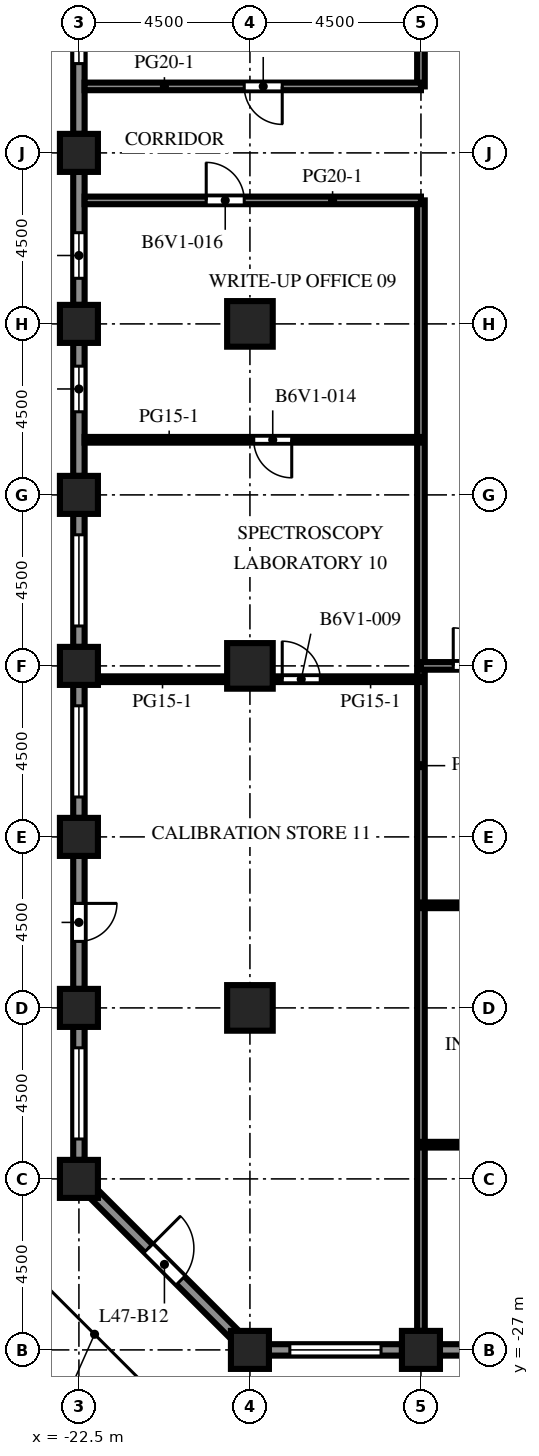
"""IFC4 building model, lengths in metres.
Left out: names, types, materials, properties, quantities, classifications, styles, units other than length and angle.
Written with IfcOpenShell. Run it as: python <this file> out.ifc"""

import sys

from ifc_helpers import new_model, si_unit, direction, frame, frame_2d, origin, origin_2d, place, context, subcontext, project, spatial, rectangle, extrude, element, fill, save


model = new_model("IFC4")
c1 = context("Model", 3, precision=1e-05, world=origin(), true_north=direction((0.0, 1.0)))
c2 = subcontext(c1, "Body", "Model", "MODEL_VIEW")
j1 = project(units=[si_unit("LENGTHUNIT", "METRE"), si_unit("PLANEANGLEUNIT", "RADIAN")], contexts=[c1])
p1 = place(None, origin())
s1 = spatial("IfcSite", under=j1, at=p1, CompositionType="ELEMENT")
p2 = place(p1, origin())
s2 = spatial("IfcBuilding", under=s1, at=p2, CompositionType="ELEMENT")
p3 = place(p2, frame((0.0, 0.0, 207.9)))
s3 = spatial("IfcBuildingStorey", under=s2, at=p3, CompositionType="ELEMENT", Elevation=207.9)
for number, where, z_axis, x_axis in (
    (1, (-22.5, -22.5, 0.0), (0.0, 0.0, 1.0), (1.0, 0.0, 0.0)),
    (2, (-22.5, -18.0, 0.0), (0.0, 0.0, 1.0), (1.0, 0.0, 0.0)),
    (3, (-22.5, -13.5, 0.0), (0.0, 0.0, 1.0), (1.0, 0.0, 0.0)),
    (4, (-22.5, -9.0, 0.0), (0.0, 0.0, 1.0), (1.0, 0.0, 0.0)),
    (5, (-22.5, -4.5, 0.0), (0.0, 0.0, 1.0), (1.0, 0.0, 0.0)),
    (6, (-22.5, 0.0, 0.0), (0.0, 0.0, 1.0), (1.0, 0.0, 0.0)),
    (7, (-22.5, 4.5, 0.0), (0.0, 0.0, 1.0), (1.0, 0.0, 0.0)),
    (8, (-18.0, -27.0, 0.0), (0.0, 0.0, 1.0), (1.0, 0.0, 0.0)),
    (9, (-13.5, -27.0, 0.0), (0.0, 0.0, 1.0), (1.0, 0.0, 0.0)),
):
    element("IfcColumn", number, at=place(p3, frame(where, z_axis=z_axis, x_axis=x_axis)), inside=s3, PredefinedType="COLUMN", context=c2, shape_type="SweptSolid", body=[
        extrude(rectangle(XDim=1.0, YDim=1.0, at=origin_2d()), origin(), (0.0, 0.0, 1.0), 4.1),
    ])
for number, where, z_axis, x_axis in (
    (10, (-18.0, -18.0, 0.0), (0.0, 0.0, 1.0), (1.0, 0.0, 0.0)),
    (11, (-18.0, -9.0, 0.0), (0.0, 0.0, 1.0), (1.0, 0.0, 0.0)),
    (12, (-18.0, 0.0, 0.0), (0.0, 0.0, 1.0), (1.0, 0.0, 0.0)),
):
    element("IfcColumn", number, at=place(p3, frame(where, z_axis=z_axis, x_axis=x_axis)), inside=s3, PredefinedType="COLUMN", context=c2, shape_type="SweptSolid", body=[
        extrude(rectangle(XDim=1.2, YDim=1.2, at=origin_2d()), origin(), (0.0, 0.0, 1.0), 4.1),
    ])
p4 = place(p3, frame((-14.0, -27.0, 0.0), z_axis=(0.0, 0.0, 1.0), x_axis=(-1.0, 0.0, 0.0)))
e13 = element("IfcWall", 13, at=p4, inside=s3, PredefinedType="SOLIDWALL", context=c2, shape_type="SweptSolid", body=[
    extrude(rectangle(XDim=3.5, YDim=0.3, at=frame_2d((1.75, 0.0))), origin(), (0.0, 0.0, 1.0), 2.85),
])
p5 = place(p4, frame((0.55, 0.0, 0.8)))
e14 = element("IfcOpeningElement", 14, at=p5, cuts=e13, PredefinedType="OPENING", context=c2, shape_type="SweptSolid", body=[
    extrude(rectangle(XDim=2.4, YDim=1.7, at=frame_2d((1.2, 0.85))), frame((0.0, 0.16, 0.0), z_axis=(0.0, -1.0, 0.0), x_axis=(1.0, 0.0, 0.0)), (0.0, 0.0, 1.0), 0.32),
])
p6 = place(p3, frame((-9.5, -27.0, 0.0), z_axis=(0.0, 0.0, 1.0), x_axis=(-1.0, 0.0, 0.0)))
e15 = element("IfcWall", 15, at=p6, inside=s3, PredefinedType="SOLIDWALL", context=c2, shape_type="SweptSolid", body=[
    extrude(rectangle(XDim=3.5, YDim=0.3, at=frame_2d((1.75, 0.0))), origin(), (0.0, 0.0, 1.0), 2.85),
])
p7 = place(p6, frame((1.25, 0.0, 0.0)))
e16 = element("IfcOpeningElement", 16, at=p7, cuts=e15, PredefinedType="OPENING", context=c2, shape_type="SweptSolid", body=[
    extrude(rectangle(XDim=1.0, YDim=2.2, at=frame_2d((0.5, 1.1))), frame((0.0, 0.16, 0.0), z_axis=(0.0, -1.0, 0.0), x_axis=(1.0, 0.0, 0.0)), (0.0, 0.0, 1.0), 0.32),
])
p8 = place(p3, frame((-22.5, 5.0, 0.0), z_axis=(0.0, 0.0, 1.0), x_axis=(0.0, 1.0, 0.0)))
e17 = element("IfcWall", 17, at=p8, inside=s3, PredefinedType="SOLIDWALL", context=c2, shape_type="SweptSolid", body=[
    extrude(rectangle(XDim=3.5, YDim=0.3, at=frame_2d((1.75, 0.0))), origin(), (0.0, 0.0, 1.0), 2.85),
])
p9 = place(p8, frame((1.85, 0.0, 0.8)))
e18 = element("IfcOpeningElement", 18, at=p9, cuts=e17, PredefinedType="OPENING", context=c2, shape_type="SweptSolid", body=[
    extrude(rectangle(XDim=1.2, YDim=1.7, at=frame_2d((0.6, 0.85))), frame((0.0, 0.16, 0.0), z_axis=(0.0, -1.0, 0.0), x_axis=(1.0, 0.0, 0.0)), (0.0, 0.0, 1.0), 0.32),
])
p10 = place(p3, frame((-22.5, 0.5, 0.0), z_axis=(0.0, 0.0, 1.0), x_axis=(0.0, 1.0, 0.0)))
e19 = element("IfcWall", 19, at=p10, inside=s3, PredefinedType="SOLIDWALL", context=c2, shape_type="SweptSolid", body=[
    extrude(rectangle(XDim=3.5, YDim=0.3, at=frame_2d((1.75, 0.0))), origin(), (0.0, 0.0, 1.0), 2.85),
])
p11 = place(p10, frame((0.7, 0.0, 0.8)))
e20 = element("IfcOpeningElement", 20, at=p11, cuts=e19, PredefinedType="OPENING", context=c2, shape_type="SweptSolid", body=[
    extrude(rectangle(XDim=1.2, YDim=1.7, at=frame_2d((0.6, 0.85))), frame((0.0, 0.16, 0.0), z_axis=(0.0, -1.0, 0.0), x_axis=(1.0, 0.0, 0.0)), (0.0, 0.0, 1.0), 0.32),
])
p12 = place(p3, frame((-22.5, -4.0, 0.0), z_axis=(0.0, 0.0, 1.0), x_axis=(0.0, 1.0, 0.0)))
e21 = element("IfcWall", 21, at=p12, inside=s3, PredefinedType="SOLIDWALL", context=c2, shape_type="SweptSolid", body=[
    extrude(rectangle(XDim=3.5, YDim=0.3, at=frame_2d((1.75, 0.0))), origin(), (0.0, 0.0, 1.0), 2.85),
])
p13 = place(p12, frame((1.688, 0.0, 0.8)))
e22 = element("IfcOpeningElement", 22, at=p13, cuts=e21, PredefinedType="OPENING", context=c2, shape_type="SweptSolid", body=[
    extrude(rectangle(XDim=1.2, YDim=1.7, at=frame_2d((0.6, 0.85))), frame((0.0, 0.16, 0.0), z_axis=(0.0, -1.0, 0.0), x_axis=(1.0, 0.0, 0.0)), (0.0, 0.0, 1.0), 0.32),
])
p14 = place(p3, frame((-22.5, -8.5, 0.0), z_axis=(0.0, 0.0, 1.0), x_axis=(0.0, 1.0, 0.0)))
e23 = element("IfcWall", 23, at=p14, inside=s3, PredefinedType="SOLIDWALL", context=c2, shape_type="SweptSolid", body=[
    extrude(rectangle(XDim=3.5, YDim=0.3, at=frame_2d((1.75, 0.0))), origin(), (0.0, 0.0, 1.0), 2.85),
])
p15 = place(p14, frame((0.55, 0.0, 0.8)))
e24 = element("IfcOpeningElement", 24, at=p15, cuts=e23, PredefinedType="OPENING", context=c2, shape_type="SweptSolid", body=[
    extrude(rectangle(XDim=2.4, YDim=1.7, at=frame_2d((1.2, 0.85))), frame((0.0, 0.16, 0.0), z_axis=(0.0, -1.0, 0.0), x_axis=(1.0, 0.0, 0.0)), (0.0, 0.0, 1.0), 0.32),
])
p16 = place(p3, frame((-22.5, -13.0, 0.0), z_axis=(0.0, 0.0, 1.0), x_axis=(0.0, 1.0, 0.0)))
e25 = element("IfcWall", 25, at=p16, inside=s3, PredefinedType="SOLIDWALL", context=c2, shape_type="SweptSolid", body=[
    extrude(rectangle(XDim=3.5, YDim=0.3, at=frame_2d((1.75, 0.0))), origin(), (0.0, 0.0, 1.0), 2.85),
])
p17 = place(p16, frame((0.55, 0.0, 0.8)))
e26 = element("IfcOpeningElement", 26, at=p17, cuts=e25, PredefinedType="OPENING", context=c2, shape_type="SweptSolid", body=[
    extrude(rectangle(XDim=2.4, YDim=1.7, at=frame_2d((1.2, 0.85))), frame((0.0, 0.16, 0.0), z_axis=(0.0, -1.0, 0.0), x_axis=(1.0, 0.0, 0.0)), (0.0, 0.0, 1.0), 0.32),
])
p18 = place(p3, frame((-22.5, -17.5, 0.0), z_axis=(0.0, 0.0, 1.0), x_axis=(0.0, 1.0, 0.0)))
e27 = element("IfcWall", 27, at=p18, inside=s3, PredefinedType="SOLIDWALL", context=c2, shape_type="SweptSolid", body=[
    extrude(rectangle(XDim=3.5, YDim=0.3, at=frame_2d((1.75, 0.0))), origin(), (0.0, 0.0, 1.0), 2.85),
])
p19 = place(p18, frame((1.25, 0.0, 0.0)))
e28 = element("IfcOpeningElement", 28, at=p19, cuts=e27, PredefinedType="OPENING", context=c2, shape_type="SweptSolid", body=[
    extrude(rectangle(XDim=1.0, YDim=2.2, at=frame_2d((0.5, 1.1))), frame((0.0, 0.16, 0.0), z_axis=(0.0, -1.0, 0.0), x_axis=(1.0, 0.0, 0.0)), (0.0, 0.0, 1.0), 0.32),
])
p20 = place(p3, frame((-22.5, -22.0, 0.0), z_axis=(0.0, 0.0, 1.0), x_axis=(0.0, 1.0, 0.0)))
e29 = element("IfcWall", 29, at=p20, inside=s3, PredefinedType="SOLIDWALL", context=c2, shape_type="SweptSolid", body=[
    extrude(rectangle(XDim=3.5, YDim=0.3, at=frame_2d((1.75, 0.0))), origin(), (0.0, 0.0, 1.0), 2.85),
])
p21 = place(p20, frame((0.55, 0.0, 0.8)))
e30 = element("IfcOpeningElement", 30, at=p21, cuts=e29, PredefinedType="OPENING", context=c2, shape_type="SweptSolid", body=[
    extrude(rectangle(XDim=2.4, YDim=1.7, at=frame_2d((1.2, 0.85))), frame((0.0, 0.16, 0.0), z_axis=(0.0, -1.0, 0.0), x_axis=(1.0, 0.0, 0.0)), (0.0, 0.0, 1.0), 0.32),
])
p22 = place(p3, frame((-18.394, -26.606, 0.0), z_axis=(0.0, 0.0, 1.0), x_axis=(-0.707106781187, 0.707106781187, 0.0)))
e31 = element("IfcWall", 31, at=p22, inside=s3, PredefinedType="SOLIDWALL", context=c2, shape_type="SweptSolid", body=[
    extrude(rectangle(XDim=5.25, YDim=0.3, at=frame_2d((2.625, 0.0))), origin(), (0.0, 0.0, 1.0), 2.85),
])
p23 = place(p22, frame((2.025, 0.0, 0.0)))
e32 = element("IfcOpeningElement", 32, at=p23, cuts=e31, PredefinedType="OPENING", context=c2, shape_type="SweptSolid", body=[
    extrude(rectangle(XDim=1.2, YDim=2.2, at=frame_2d((0.6, 1.1))), frame((0.0, 0.16, 0.0), z_axis=(0.0, -1.0, 0.0), x_axis=(1.0, 0.0, 0.0)), (0.0, 0.0, 1.0), 0.32),
])
p24 = place(p3, frame((-13.5, -26.5, 0.0), z_axis=(0.0, 0.0, 1.0), x_axis=(0.0, 1.0, 0.0)))
e33 = element("IfcWall", 33, at=p24, inside=s3, PredefinedType="PARTITIONING", context=c2, shape_type="SweptSolid", body=[
    extrude(rectangle(XDim=29.75, YDim=0.2, at=frame_2d((14.875, 0.0))), origin(), (0.0, 0.0, 1.0), 3.65),
])
p25 = place(p3, frame((-13.5, 6.25, 0.0), z_axis=(0.0, 0.0, 1.0), x_axis=(0.0, 1.0, 0.0)))
e34 = element("IfcWall", 34, at=p25, inside=s3, PredefinedType="PARTITIONING", context=c2, shape_type="SweptSolid", body=[
    extrude(rectangle(XDim=20.25, YDim=0.2, at=frame_2d((10.125, 0.0))), origin(), (0.0, 0.0, 1.0), 3.65),
])
p26 = place(p3, frame((21.0, -21.6, 0.0), z_axis=(0.0, 0.0, 1.0), x_axis=(-1.0, 0.0, 0.0)))
e35 = element("IfcWall", 35, at=p26, inside=s3, PredefinedType="PARTITIONING", context=c2, shape_type="SweptSolid", body=[
    extrude(rectangle(XDim=34.5, YDim=0.15, at=frame_2d((17.25, 0.0))), origin(), (0.0, 0.0, 1.0), 3.65),
])
p27 = place(p26, frame((29.9, 0.0, 0.0)))
e36 = element("IfcOpeningElement", 36, at=p27, cuts=e35, PredefinedType="OPENING", context=c2, shape_type="SweptSolid", body=[
    extrude(rectangle(XDim=1.0, YDim=2.1, at=frame_2d((0.5, 1.05))), frame((0.0, 0.085, 0.0), z_axis=(0.0, -1.0, 0.0), x_axis=(1.0, 0.0, 0.0)), (0.0, 0.0, 1.0), 0.17),
])
p28 = place(p26, frame((21.4, 0.0, 0.0)))
e37 = element("IfcOpeningElement", 37, at=p28, cuts=e35, PredefinedType="OPENING", context=c2, shape_type="SweptSolid", body=[
    extrude(rectangle(XDim=1.0, YDim=2.1, at=frame_2d((0.5, 1.05))), frame((0.0, 0.085, 0.0), z_axis=(0.0, -1.0, 0.0), x_axis=(1.0, 0.0, 0.0)), (0.0, 0.0, 1.0), 0.17),
])
p29 = place(p26, frame((13.15, 0.0, 0.0)))
e38 = element("IfcOpeningElement", 38, at=p29, cuts=e35, PredefinedType="OPENING", context=c2, shape_type="SweptSolid", body=[
    extrude(rectangle(XDim=1.0, YDim=2.1, at=frame_2d((0.5, 1.05))), frame((0.0, 0.085, 0.0), z_axis=(0.0, -1.0, 0.0), x_axis=(1.0, 0.0, 0.0)), (0.0, 0.0, 1.0), 0.17),
])
p30 = place(p26, frame((5.15, 0.0, 0.0)))
e39 = element("IfcOpeningElement", 39, at=p30, cuts=e35, PredefinedType="OPENING", context=c2, shape_type="SweptSolid", body=[
    extrude(rectangle(XDim=1.0, YDim=2.1, at=frame_2d((0.5, 1.05))), frame((0.0, 0.085, 0.0), z_axis=(0.0, -1.0, 0.0), x_axis=(1.0, 0.0, 0.0)), (0.0, 0.0, 1.0), 0.17),
])
p31 = place(p3, frame((21.0, -15.3, 0.0), z_axis=(0.0, 0.0, 1.0), x_axis=(-1.0, 0.0, 0.0)))
e40 = element("IfcWall", 40, at=p31, inside=s3, PredefinedType="PARTITIONING", context=c2, shape_type="SweptSolid", body=[
    extrude(rectangle(XDim=34.5, YDim=0.15, at=frame_2d((17.25, 0.0))), origin(), (0.0, 0.0, 1.0), 3.65),
])
p32 = place(p31, frame((28.9, 0.0, 0.0)))
e41 = element("IfcOpeningElement", 41, at=p32, cuts=e40, PredefinedType="OPENING", context=c2, shape_type="SweptSolid", body=[
    extrude(rectangle(XDim=1.0, YDim=2.1, at=frame_2d((0.5, 1.05))), frame((0.0, 0.085, 0.0), z_axis=(0.0, -1.0, 0.0), x_axis=(1.0, 0.0, 0.0)), (0.0, 0.0, 1.0), 0.17),
])
p33 = place(p31, frame((19.4, 0.0, 0.0)))
e42 = element("IfcOpeningElement", 42, at=p33, cuts=e40, PredefinedType="OPENING", context=c2, shape_type="SweptSolid", body=[
    extrude(rectangle(XDim=1.0, YDim=2.1, at=frame_2d((0.5, 1.05))), frame((0.0, 0.085, 0.0), z_axis=(0.0, -1.0, 0.0), x_axis=(1.0, 0.0, 0.0)), (0.0, 0.0, 1.0), 0.17),
])
p34 = place(p31, frame((14.15, 0.0, 0.0)))
e43 = element("IfcOpeningElement", 43, at=p34, cuts=e40, PredefinedType="OPENING", context=c2, shape_type="SweptSolid", body=[
    extrude(rectangle(XDim=1.0, YDim=2.1, at=frame_2d((0.5, 1.05))), frame((0.0, 0.085, 0.0), z_axis=(0.0, -1.0, 0.0), x_axis=(1.0, 0.0, 0.0)), (0.0, 0.0, 1.0), 0.17),
])
p35 = place(p31, frame((3.9, 0.0, 0.0)))
e44 = element("IfcOpeningElement", 44, at=p35, cuts=e40, PredefinedType="OPENING", context=c2, shape_type="SweptSolid", body=[
    extrude(rectangle(XDim=1.0, YDim=2.1, at=frame_2d((0.5, 1.05))), frame((0.0, 0.085, 0.0), z_axis=(0.0, -1.0, 0.0), x_axis=(1.0, 0.0, 0.0)), (0.0, 0.0, 1.0), 0.17),
])
p36 = place(p3, frame((-22.0, -9.35, 0.0), z_axis=(0.0, 0.0, 1.0), x_axis=(1.0, 0.0, 0.0)))
e45 = element("IfcWall", 45, at=p36, inside=s3, PredefinedType="PARTITIONING", context=c2, shape_type="SweptSolid", body=[
    extrude(rectangle(XDim=3.4, YDim=0.15, at=frame_2d((1.7, 0.0))), origin(), (0.0, 0.0, 1.0), 3.65),
])
p37 = place(p3, frame((-13.5, -9.35, 0.0), z_axis=(0.0, 0.0, 1.0), x_axis=(-1.0, 0.0, 0.0)))
e46 = element("IfcWall", 46, at=p37, inside=s3, PredefinedType="PARTITIONING", context=c2, shape_type="SweptSolid", body=[
    extrude(rectangle(XDim=3.9, YDim=0.15, at=frame_2d((1.95, 0.0))), origin(), (0.0, 0.0, 1.0), 3.65),
])
p38 = place(p37, frame((2.65, 0.0, 0.0)))
e47 = element("IfcOpeningElement", 47, at=p38, cuts=e46, PredefinedType="OPENING", context=c2, shape_type="SweptSolid", body=[
    extrude(rectangle(XDim=1.0, YDim=2.1, at=frame_2d((0.5, 1.05))), frame((0.0, 0.085, 0.0), z_axis=(0.0, -1.0, 0.0), x_axis=(1.0, 0.0, 0.0)), (0.0, 0.0, 1.0), 0.17),
])
p39 = place(p3, frame((-10.5, -9.0, 0.0), z_axis=(0.0, 0.0, 1.0), x_axis=(-1.0, 0.0, 0.0)))
e48 = element("IfcWall", 48, at=p39, inside=s3, PredefinedType="PARTITIONING", context=c2, shape_type="SweptSolid", body=[
    extrude(rectangle(XDim=3.0, YDim=0.2, at=frame_2d((1.5, 0.0))), origin(), (0.0, 0.0, 1.0), 3.65),
])
p40 = place(p39, frame((1.15, 0.0, 0.0)))
e49 = element("IfcOpeningElement", 49, at=p40, cuts=e48, PredefinedType="OPENING", context=c2, shape_type="SweptSolid", body=[
    extrude(rectangle(XDim=1.0, YDim=2.1, at=frame_2d((0.5, 1.05))), frame((0.0, 0.11, 0.0), z_axis=(0.0, -1.0, 0.0), x_axis=(1.0, 0.0, 0.0)), (0.0, 0.0, 1.0), 0.22),
])
p41 = place(p3, frame((-13.5, -3.05, 0.0), z_axis=(0.0, 0.0, 1.0), x_axis=(-1.0, 0.0, 0.0)))
e50 = element("IfcWall", 50, at=p41, inside=s3, PredefinedType="PARTITIONING", context=c2, shape_type="SweptSolid", body=[
    extrude(rectangle(XDim=8.85, YDim=0.15, at=frame_2d((4.425, 0.0))), origin(), (0.0, 0.0, 1.0), 3.65),
])
p42 = place(p41, frame((3.4, 0.0, 0.0)))
e51 = element("IfcOpeningElement", 51, at=p42, cuts=e50, PredefinedType="OPENING", context=c2, shape_type="SweptSolid", body=[
    extrude(rectangle(XDim=1.0, YDim=2.1, at=frame_2d((0.5, 1.05))), frame((0.0, 0.085, 0.0), z_axis=(0.0, -1.0, 0.0), x_axis=(1.0, 0.0, 0.0)), (0.0, 0.0, 1.0), 0.17),
])
p43 = place(p3, frame((-13.5, 3.25, 0.0), z_axis=(0.0, 0.0, 1.0), x_axis=(-1.0, 0.0, 0.0)))
e52 = element("IfcWall", 52, at=p43, inside=s3, PredefinedType="PARTITIONING", context=c2, shape_type="SweptSolid", body=[
    extrude(rectangle(XDim=8.85, YDim=0.2, at=frame_2d((4.425, 0.0))), origin(), (0.0, 0.0, 1.0), 3.65),
])
p44 = place(p43, frame((4.65, 0.0, 0.0)))
e53 = element("IfcOpeningElement", 53, at=p44, cuts=e52, PredefinedType="OPENING", context=c2, shape_type="SweptSolid", body=[
    extrude(rectangle(XDim=1.0, YDim=2.1, at=frame_2d((0.5, 1.05))), frame((0.0, 0.11, 0.0), z_axis=(0.0, -1.0, 0.0), x_axis=(1.0, 0.0, 0.0)), (0.0, 0.0, 1.0), 0.22),
])
p45 = place(p3, frame((-22.35, 6.25, 0.0), z_axis=(0.0, 0.0, 1.0), x_axis=(1.0, 0.0, 0.0)))
e54 = element("IfcWall", 54, at=p45, inside=s3, PredefinedType="PARTITIONING", context=c2, shape_type="SweptSolid", body=[
    extrude(rectangle(XDim=8.85, YDim=0.2, at=frame_2d((4.425, 0.0))), origin(), (0.0, 0.0, 1.0), 3.65),
])
p46 = place(p45, frame((4.2, 0.0, 0.0)))
e55 = element("IfcOpeningElement", 55, at=p46, cuts=e54, PredefinedType="OPENING", context=c2, shape_type="SweptSolid", body=[
    extrude(rectangle(XDim=1.0, YDim=2.1, at=frame_2d((0.5, 1.05))), frame((0.0, 0.11, 0.0), z_axis=(0.0, -1.0, 0.0), x_axis=(1.0, 0.0, 0.0)), (0.0, 0.0, 1.0), 0.22),
])
p47 = place(p5, origin())
e56 = element("IfcWindow", 56, at=p47, inside=s3, PartitioningType="SINGLE_PANEL", PredefinedType="WINDOW", context=c2, shape_type="SweptSolid", body=[
    extrude(rectangle(XDim=2.4, YDim=1.7, at=frame_2d((1.2, 0.85))), frame((0.0, 0.03, 0.0), z_axis=(0.0, -1.0, 0.0), x_axis=(1.0, 0.0, 0.0)), (0.0, 0.0, 1.0), 0.06),
])
fill(e14, e56)
p48 = place(p9, origin())
e57 = element("IfcWindow", 57, at=p48, inside=s3, PartitioningType="SINGLE_PANEL", PredefinedType="WINDOW", context=c2, shape_type="SweptSolid", body=[
    extrude(rectangle(XDim=1.2, YDim=1.7, at=frame_2d((0.6, 0.85))), frame((0.0, 0.03, 0.0), z_axis=(0.0, -1.0, 0.0), x_axis=(1.0, 0.0, 0.0)), (0.0, 0.0, 1.0), 0.06),
])
fill(e18, e57)
p49 = place(p11, origin())
e58 = element("IfcWindow", 58, at=p49, inside=s3, PartitioningType="SINGLE_PANEL", PredefinedType="WINDOW", context=c2, shape_type="SweptSolid", body=[
    extrude(rectangle(XDim=1.2, YDim=1.7, at=frame_2d((0.6, 0.85))), frame((0.0, 0.03, 0.0), z_axis=(0.0, -1.0, 0.0), x_axis=(1.0, 0.0, 0.0)), (0.0, 0.0, 1.0), 0.06),
])
fill(e20, e58)
p50 = place(p13, origin())
e59 = element("IfcWindow", 59, at=p50, inside=s3, PartitioningType="SINGLE_PANEL", PredefinedType="WINDOW", context=c2, shape_type="SweptSolid", body=[
    extrude(rectangle(XDim=1.2, YDim=1.7, at=frame_2d((0.6, 0.85))), frame((0.0, 0.03, 0.0), z_axis=(0.0, -1.0, 0.0), x_axis=(1.0, 0.0, 0.0)), (0.0, 0.0, 1.0), 0.06),
])
fill(e22, e59)
p51 = place(p15, origin())
e60 = element("IfcWindow", 60, at=p51, inside=s3, PartitioningType="SINGLE_PANEL", PredefinedType="WINDOW", context=c2, shape_type="SweptSolid", body=[
    extrude(rectangle(XDim=2.4, YDim=1.7, at=frame_2d((1.2, 0.85))), frame((0.0, 0.03, 0.0), z_axis=(0.0, -1.0, 0.0), x_axis=(1.0, 0.0, 0.0)), (0.0, 0.0, 1.0), 0.06),
])
fill(e24, e60)
p52 = place(p17, origin())
e61 = element("IfcWindow", 61, at=p52, inside=s3, PartitioningType="SINGLE_PANEL", PredefinedType="WINDOW", context=c2, shape_type="SweptSolid", body=[
    extrude(rectangle(XDim=2.4, YDim=1.7, at=frame_2d((1.2, 0.85))), frame((0.0, 0.03, 0.0), z_axis=(0.0, -1.0, 0.0), x_axis=(1.0, 0.0, 0.0)), (0.0, 0.0, 1.0), 0.06),
])
fill(e26, e61)
p53 = place(p19, origin())
e62 = element("IfcDoor", 62, at=p53, inside=s3, OperationType="SINGLE_SWING_RIGHT", PredefinedType="DOOR", context=c2, shape_type="SweptSolid", body=[
    extrude(rectangle(XDim=1.0, YDim=2.2, at=frame_2d((0.5, 1.1))), frame((0.0, 0.025, 0.0), z_axis=(0.0, -1.0, 0.0), x_axis=(1.0, 0.0, 0.0)), (0.0, 0.0, 1.0), 0.05),
])
fill(e28, e62)
p54 = place(p21, origin())
e63 = element("IfcWindow", 63, at=p54, inside=s3, PartitioningType="SINGLE_PANEL", PredefinedType="WINDOW", context=c2, shape_type="SweptSolid", body=[
    extrude(rectangle(XDim=2.4, YDim=1.7, at=frame_2d((1.2, 0.85))), frame((0.0, 0.03, 0.0), z_axis=(0.0, -1.0, 0.0), x_axis=(1.0, 0.0, 0.0)), (0.0, 0.0, 1.0), 0.06),
])
fill(e30, e63)
p55 = place(p23, origin())
e64 = element("IfcDoor", 64, at=p55, inside=s3, OperationType="SINGLE_SWING_RIGHT", PredefinedType="DOOR", context=c2, shape_type="SweptSolid", body=[
    extrude(rectangle(XDim=1.2, YDim=2.2, at=frame_2d((0.6, 1.1))), frame((0.0, 0.025, 0.0), z_axis=(0.0, -1.0, 0.0), x_axis=(1.0, 0.0, 0.0)), (0.0, 0.0, 1.0), 0.05),
])
fill(e32, e64)
p56 = place(p38, origin())
e65 = element("IfcDoor", 65, at=p56, inside=s3, OperationType="SINGLE_SWING_RIGHT", PredefinedType="DOOR", context=c2, shape_type="SweptSolid", body=[
    extrude(rectangle(XDim=1.0, YDim=2.1, at=frame_2d((0.5, 1.05))), frame((0.0, 0.025, 0.0), z_axis=(0.0, -1.0, 0.0), x_axis=(1.0, 0.0, 0.0)), (0.0, 0.0, 1.0), 0.05),
])
fill(e47, e65)
p57 = place(p40, origin())
e66 = element("IfcDoor", 66, at=p57, inside=s3, OperationType="SINGLE_SWING_RIGHT", PredefinedType="DOOR", context=c2, shape_type="SweptSolid", body=[
    extrude(rectangle(XDim=1.0, YDim=2.1, at=frame_2d((0.5, 1.05))), frame((0.0, 0.025, 0.0), z_axis=(0.0, -1.0, 0.0), x_axis=(1.0, 0.0, 0.0)), (0.0, 0.0, 1.0), 0.05),
])
fill(e49, e66)
p58 = place(p42, origin())
e67 = element("IfcDoor", 67, at=p58, inside=s3, OperationType="SINGLE_SWING_LEFT", PredefinedType="DOOR", context=c2, shape_type="SweptSolid", body=[
    extrude(rectangle(XDim=1.0, YDim=2.1, at=frame_2d((0.5, 1.05))), frame((0.0, 0.025, 0.0), z_axis=(0.0, -1.0, 0.0), x_axis=(1.0, 0.0, 0.0)), (0.0, 0.0, 1.0), 0.05),
])
fill(e51, e67)
p59 = place(p44, origin())
e68 = element("IfcDoor", 68, at=p59, inside=s3, OperationType="SINGLE_SWING_RIGHT", PredefinedType="DOOR", context=c2, shape_type="SweptSolid", body=[
    extrude(rectangle(XDim=1.0, YDim=2.1, at=frame_2d((0.5, 1.05))), frame((0.0, 0.025, 0.0), z_axis=(0.0, -1.0, 0.0), x_axis=(1.0, 0.0, 0.0)), (0.0, 0.0, 1.0), 0.05),
])
fill(e53, e68)
p60 = place(p46, origin())
e69 = element("IfcDoor", 69, at=p60, inside=s3, OperationType="SINGLE_SWING_RIGHT", PredefinedType="DOOR", context=c2, shape_type="SweptSolid", body=[
    extrude(rectangle(XDim=1.0, YDim=2.1, at=frame_2d((0.5, 1.05))), frame((0.0, 0.025, 0.0), z_axis=(0.0, -1.0, 0.0), x_axis=(1.0, 0.0, 0.0)), (0.0, 0.0, 1.0), 0.05),
])
fill(e55, e69)
save(model, sys.argv[1])
